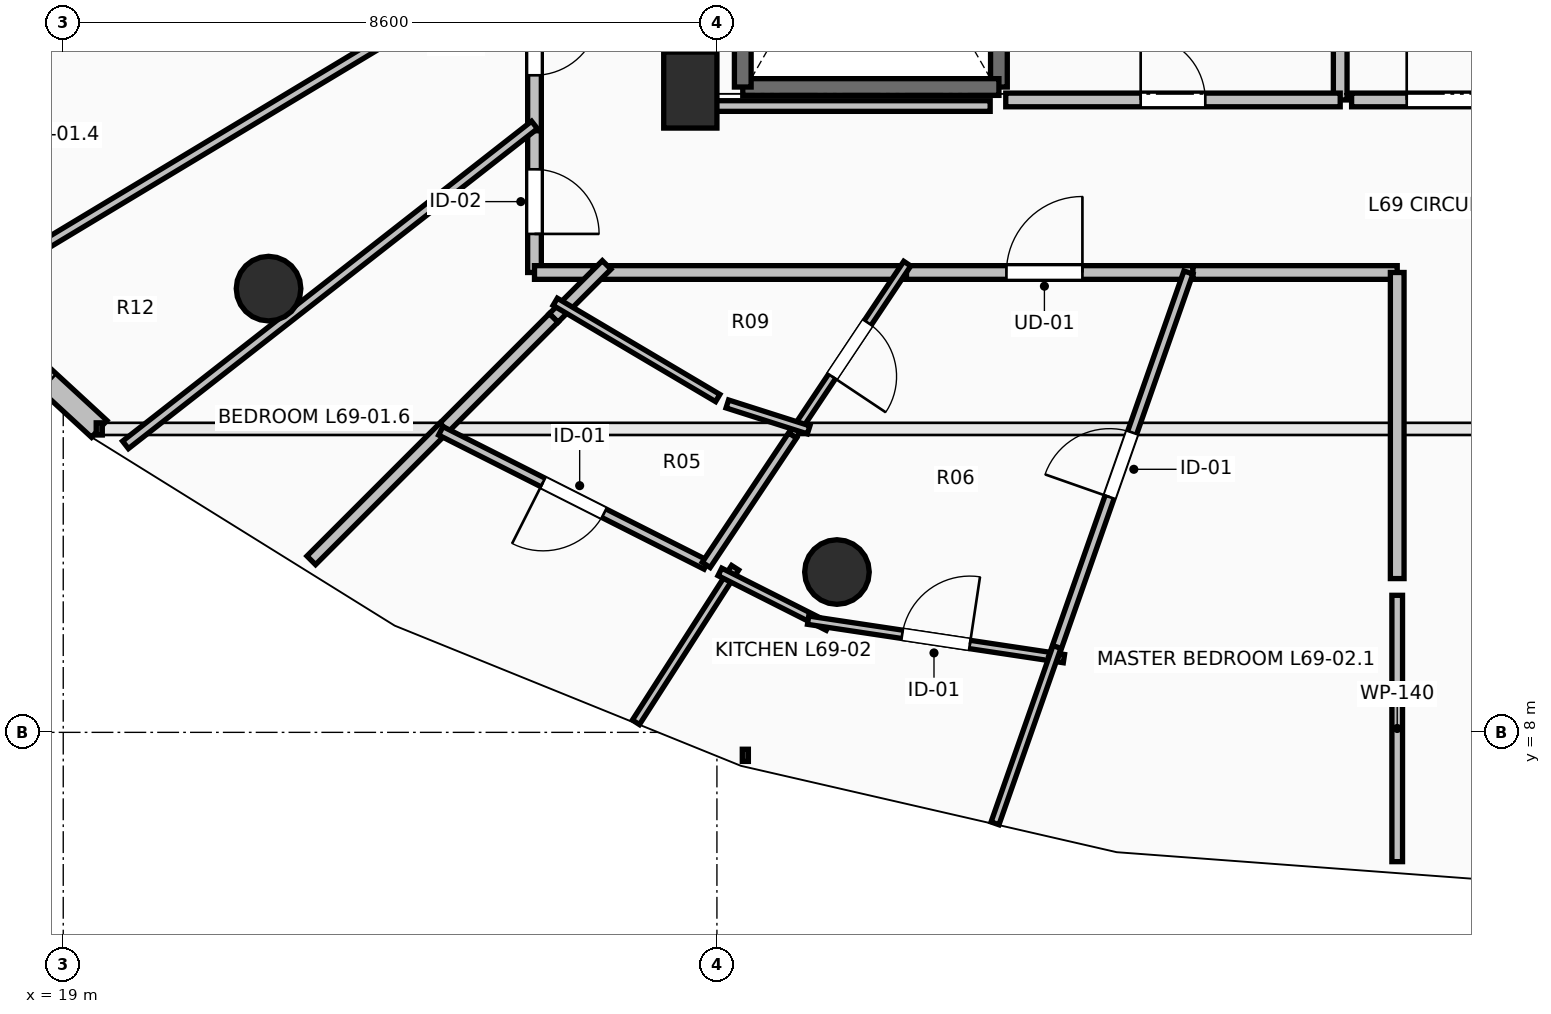
"""IFC4 building model, lengths in metres.
Left out: names, types, materials, properties, quantities, classifications, styles, units other than length and angle.
Written with IfcOpenShell. Run it as: python <this file> out.ifc"""

import sys

from ifc_helpers import new_model, si_unit, direction, frame, frame_2d, origin, origin_2d, place, context, subcontext, project, spatial, rectangle, circle, extrude, element, fill, save


model = new_model("IFC4")
c1 = context("Model", 3, precision=1e-05, world=origin(), true_north=direction((0.0, 1.0)))
c2 = subcontext(c1, "Body", "Model", "MODEL_VIEW")
j1 = project(units=[si_unit("LENGTHUNIT", "METRE"), si_unit("PLANEANGLEUNIT", "RADIAN")], contexts=[c1])
p1 = place(None, origin())
s1 = spatial("IfcSite", under=j1, at=p1, CompositionType="ELEMENT")
p2 = place(p1, origin())
s2 = spatial("IfcBuilding", under=s1, at=p2, CompositionType="ELEMENT")
p3 = place(p2, frame((0.0, 0.0, 255.55)))
s3 = spatial("IfcBuildingStorey", under=s2, at=p3, CompositionType="ELEMENT", Elevation=255.55)
for number, where, z_axis, x_axis in (
    (1, (21.701, 13.838, 0.0), (0.0, 0.0, 1.0), (-0.707, -0.707, 0.0)),
    (2, (29.179, 10.109, 0.0), (0.0, 0.0, 1.0), (-0.383, -0.924, 0.0)),
):
    element("IfcColumn", number, at=place(p3, frame(where, z_axis=z_axis, x_axis=x_axis)), inside=s3, PredefinedType="COLUMN", context=c2, shape_type="SweptSolid", body=[
        extrude(circle(Radius=0.425, at=origin_2d()), origin(), (0.0, 0.0, 1.0), 3.55),
    ])
p4 = place(p3, frame((27.25, 16.45, 0.0), z_axis=(0.0, 0.0, 1.0), x_axis=(1.0, 0.0, 0.0)))
e3 = element("IfcColumn", 3, at=p4, inside=s3, PredefinedType="PILASTER", context=c2, shape_type="SweptSolid", body=[
    extrude(rectangle(XDim=0.7, YDim=1.0, at=origin_2d()), origin(), (0.0, 0.0, 1.0), 3.55),
])
p5 = place(p3, frame((16.216, 14.994, 0.0), z_axis=(0.0, 0.0, 1.0), x_axis=(0.735445373611, -0.677584018727, 0.0)))
e4 = element("IfcWall", 4, at=p5, inside=s3, PredefinedType="STANDARD", context=c2, shape_type="SweptSolid", body=[
    extrude(rectangle(XDim=4.43, YDim=0.3, at=frame_2d((2.215, 0.0))), origin(), (0.0, 0.0, 1.0), 3.29),
])
p6 = place(p5, frame((0.258, 0.0, 0.85)))
e5 = element("IfcOpeningElement", 5, at=p6, cuts=e4, PredefinedType="OPENING", context=c2, shape_type="SweptSolid", body=[
    extrude(rectangle(XDim=1.2, YDim=1.95, at=frame_2d((0.6, 0.975))), frame((0.0, 0.165, 0.0), z_axis=(0.0, -1.0, 0.0), x_axis=(1.0, 0.0, 0.0)), (0.0, 0.0, 1.0), 0.33),
])
p7 = place(p5, frame((2.323, 0.0, 0.85)))
e6 = element("IfcOpeningElement", 6, at=p7, cuts=e4, PredefinedType="OPENING", context=c2, shape_type="SweptSolid", body=[
    extrude(rectangle(XDim=1.2, YDim=1.95, at=frame_2d((0.6, 0.975))), frame((0.0, 0.165, 0.0), z_axis=(0.0, -1.0, 0.0), x_axis=(1.0, 0.0, 0.0)), (0.0, 0.0, 1.0), 0.33),
])
p8 = place(p3, frame((31.31, 23.91, 0.0), z_axis=(0.0, 0.0, 1.0), x_axis=(0.0, -1.0, 0.0)))
e7 = element("IfcWall", 7, at=p8, inside=s3, PredefinedType="SOLIDWALL", context=c2, shape_type="SweptSolid", body=[
    extrude(rectangle(XDim=7.42, YDim=0.22, at=frame_2d((3.71, 0.0))), origin(), (0.0, 0.0, 1.0), 3.29),
])
p9 = place(p3, frame((31.31, 16.49, 0.0), z_axis=(0.0, 0.0, 1.0), x_axis=(-1.0, 0.0, 0.0)))
e8 = element("IfcWall", 8, at=p9, inside=s3, PredefinedType="SOLIDWALL", context=c2, shape_type="SweptSolid", body=[
    extrude(rectangle(XDim=3.37, YDim=0.22, at=frame_2d((1.685, 0.0))), origin(), (0.0, 0.0, 1.0), 3.29),
])
p10 = place(p3, frame((27.94, 16.49, 0.0), z_axis=(0.0, 0.0, 1.0), x_axis=(0.0, 1.0, 0.0)))
e9 = element("IfcWall", 9, at=p10, inside=s3, PredefinedType="SOLIDWALL", context=c2, shape_type="SweptSolid", body=[
    extrude(rectangle(XDim=7.42, YDim=0.22, at=frame_2d((3.71, 0.0))), origin(), (0.0, 0.0, 1.0), 3.29),
])
p11 = place(p3, frame((35.8, 16.32, 0.0), z_axis=(0.0, 0.0, 1.0), x_axis=(0.0, 1.0, 0.0)))
e10 = element("IfcWall", 10, at=p11, inside=s3, PredefinedType="PARTITIONING", context=c2, shape_type="SweptSolid", body=[
    extrude(rectangle(XDim=5.13, YDim=0.18, at=frame_2d((2.565, 0.0))), origin(), (0.0, 0.0, 1.0), 3.29),
])
p12 = place(p3, frame((31.4, 16.32, 0.0), z_axis=(0.0, 0.0, 1.0), x_axis=(1.0, 0.0, 0.0)))
e11 = element("IfcWall", 11, at=p12, inside=s3, PredefinedType="PARTITIONING", context=c2, shape_type="SweptSolid", body=[
    extrude(rectangle(XDim=4.4, YDim=0.18, at=frame_2d((2.2, 0.0))), origin(), (0.0, 0.0, 1.0), 3.29),
])
p13 = place(p12, frame((1.775, 0.0, 0.0)))
e12 = element("IfcOpeningElement", 12, at=p13, cuts=e11, PredefinedType="OPENING", context=c2, shape_type="SweptSolid", body=[
    extrude(rectangle(XDim=0.85, YDim=2.1, at=frame_2d((0.425, 1.05))), frame((0.0, 0.105, 0.0), z_axis=(0.0, -1.0, 0.0), x_axis=(1.0, 0.0, 0.0)), (0.0, 0.0, 1.0), 0.21),
])
p14 = place(p3, frame((35.95, 16.32, 0.0), z_axis=(0.0, 0.0, 1.0), x_axis=(1.0, 0.0, 0.0)))
e13 = element("IfcWall", 13, at=p14, inside=s3, PredefinedType="PARTITIONING", context=c2, shape_type="SweptSolid", body=[
    extrude(rectangle(XDim=2.85, YDim=0.18, at=frame_2d((1.425, 0.0))), origin(), (0.0, 0.0, 1.0), 3.29),
])
p15 = place(p14, frame((0.725, 0.0, 0.0)))
e14 = element("IfcOpeningElement", 14, at=p15, cuts=e13, PredefinedType="OPENING", context=c2, shape_type="SweptSolid", body=[
    extrude(rectangle(XDim=1.4, YDim=2.2, at=frame_2d((0.7, 1.1))), frame((0.0, 0.105, 0.0), z_axis=(0.0, -1.0, 0.0), x_axis=(1.0, 0.0, 0.0)), (0.0, 0.0, 1.0), 0.21),
])
p16 = place(p3, frame((25.2, 18.224, 0.0), z_axis=(0.0, 0.0, 1.0), x_axis=(0.0, -1.0, 0.0)))
e15 = element("IfcWall", 15, at=p16, inside=s3, PredefinedType="PARTITIONING", context=c2, shape_type="SweptSolid", body=[
    extrude(rectangle(XDim=2.309, YDim=0.18, at=frame_2d((1.155, 0.0))), origin(), (0.0, 0.0, 1.0), 2.482),
])
p17 = place(p16, frame((0.729, 0.0, 0.0)))
e16 = element("IfcOpeningElement", 16, at=p17, cuts=e15, PredefinedType="OPENING", context=c2, shape_type="SweptSolid", body=[
    extrude(rectangle(XDim=0.85, YDim=2.1, at=frame_2d((0.425, 1.05))), frame((0.0, 0.105, 0.0), z_axis=(0.0, -1.0, 0.0), x_axis=(1.0, 0.0, 0.0)), (0.0, 0.0, 1.0), 0.21),
])
p18 = place(p3, frame((25.2, 15.915, 0.0), z_axis=(0.0, 0.0, 1.0), x_axis=(0.0, -1.0, 0.0)))
e17 = element("IfcWall", 17, at=p18, inside=s3, PredefinedType="PARTITIONING", context=c2, shape_type="SweptSolid", body=[
    extrude(rectangle(XDim=1.865, YDim=0.18, at=frame_2d((0.933, 0.0))), origin(), (0.0, 0.0, 1.0), 2.482),
])
p19 = place(p18, frame((0.508, 0.0, 0.0)))
e18 = element("IfcOpeningElement", 18, at=p19, cuts=e17, PredefinedType="OPENING", context=c2, shape_type="SweptSolid", body=[
    extrude(rectangle(XDim=0.85, YDim=2.1, at=frame_2d((0.425, 1.05))), frame((0.0, 0.105, 0.0), z_axis=(0.0, -1.0, 0.0), x_axis=(1.0, 0.0, 0.0)), (0.0, 0.0, 1.0), 0.21),
])
p20 = place(p3, frame((25.2, 14.05, 0.0), z_axis=(0.0, 0.0, 1.0), x_axis=(1.0, 0.0, 0.0)))
e19 = element("IfcWall", 19, at=p20, inside=s3, PredefinedType="PARTITIONING", context=c2, shape_type="SweptSolid", body=[
    extrude(rectangle(XDim=0.91, YDim=0.18, at=frame_2d((0.455, 0.0))), origin(), (0.0, 0.0, 1.0), 3.022),
])
p21 = place(p3, frame((29.954, 14.05, 0.0), z_axis=(0.0, 0.0, 1.0), x_axis=(1.0, 0.0, 0.0)))
e20 = element("IfcWall", 20, at=p21, inside=s3, PredefinedType="PARTITIONING", context=c2, shape_type="SweptSolid", body=[
    extrude(rectangle(XDim=3.909, YDim=0.18, at=frame_2d((1.955, 0.0))), origin(), (0.0, 0.0, 1.0), 2.936),
])
p22 = place(p21, frame((1.455, 0.0, 0.0)))
e21 = element("IfcOpeningElement", 21, at=p22, cuts=e20, PredefinedType="OPENING", context=c2, shape_type="SweptSolid", body=[
    extrude(rectangle(XDim=1.0, YDim=2.15, at=frame_2d((0.5, 1.075))), frame((0.0, 0.105, 0.0), z_axis=(0.0, -1.0, 0.0), x_axis=(1.0, 0.0, 0.0)), (0.0, 0.0, 1.0), 0.21),
])
p23 = place(p3, frame((25.97, 14.05, 0.0), z_axis=(0.0, 0.0, 1.0), x_axis=(1.0, 0.0, 0.0)))
e22 = element("IfcWall", 22, at=p23, inside=s3, PredefinedType="PARTITIONING", context=c2, shape_type="SweptSolid", body=[
    extrude(rectangle(XDim=4.124, YDim=0.18, at=frame_2d((2.062, 0.0))), origin(), (0.0, 0.0, 1.0), 2.482),
])
p24 = place(p3, frame((33.863, 14.05, 0.0), z_axis=(0.0, 0.0, 1.0), x_axis=(1.0, 0.0, 0.0)))
e23 = element("IfcWall", 23, at=p24, inside=s3, PredefinedType="PARTITIONING", context=c2, shape_type="SweptSolid", body=[
    extrude(rectangle(XDim=2.687, YDim=0.18, at=frame_2d((1.344, 0.0))), origin(), (0.0, 0.0, 1.0), 2.936),
])
p25 = place(p3, frame((36.55, 14.05, 0.0), z_axis=(0.0, 0.0, 1.0), x_axis=(0.0, -1.0, 0.0)))
e24 = element("IfcWall", 24, at=p25, inside=s3, PredefinedType="PARTITIONING", context=c2, shape_type="SweptSolid", body=[
    extrude(rectangle(XDim=4.027, YDim=0.18, at=frame_2d((2.014, 0.0))), origin(), (0.0, 0.0, 1.0), 2.936),
])
p26 = place(p3, frame((15.533, 15.962, 0.0), z_axis=(0.0, 0.0, 1.0), x_axis=(0.913015836792, 0.407924112756, 0.0)))
e25 = element("IfcWall", 25, at=p26, inside=s3, PredefinedType="PARTITIONING", context=c2, shape_type="SweptSolid", body=[
    extrude(rectangle(XDim=10.588, YDim=0.125, at=frame_2d((5.294, 0.0))), origin(), (0.0, 0.0, 1.0), 2.482),
])
p27 = place(p3, frame((17.602, 13.72, 0.0), z_axis=(0.0, 0.0, 1.0), x_axis=(0.856734134601, 0.515758298633, 0.0)))
e26 = element("IfcWall", 26, at=p27, inside=s3, PredefinedType="PARTITIONING", context=c2, shape_type="SweptSolid", body=[
    extrude(rectangle(XDim=8.868, YDim=0.125, at=frame_2d((4.434, 0.0))), origin(), (0.0, 0.0, 1.0), 2.482),
])
p28 = place(p3, frame((19.819, 11.782, 0.0), z_axis=(0.0, 0.0, 1.0), x_axis=(0.78765580417, 0.61611552014, 0.0)))
e27 = element("IfcWall", 27, at=p28, inside=s3, PredefinedType="PARTITIONING", context=c2, shape_type="SweptSolid", body=[
    extrude(rectangle(XDim=6.832, YDim=0.125, at=frame_2d((3.416, 0.0))), origin(), (0.0, 0.0, 1.0), 2.482),
])
p29 = place(p3, frame((22.263, 10.263, 0.0), z_axis=(0.0, 0.0, 1.0), x_axis=(0.707106781187, 0.707106781187, 0.0)))
e28 = element("IfcWall", 28, at=p29, inside=s3, PredefinedType="PARTITIONING", context=c2, shape_type="SweptSolid", body=[
    extrude(rectangle(XDim=2.473, YDim=0.16, at=frame_2d((1.237, 0.0))), origin(), (0.0, 0.0, 1.0), 3.29),
])
p30 = place(p3, frame((25.452, 13.452, 0.0), z_axis=(0.0, 0.0, 1.0), x_axis=(0.707106781187, 0.707106781187, 0.0)))
e29 = element("IfcWall", 29, at=p30, inside=s3, PredefinedType="PARTITIONING", context=c2, shape_type="SweptSolid", body=[
    extrude(rectangle(XDim=0.986, YDim=0.16, at=frame_2d((0.493, 0.0))), origin(), (0.0, 0.0, 1.0), 3.022),
])
p31 = place(p3, frame((24.012, 12.012, 0.0), z_axis=(0.0, 0.0, 1.0), x_axis=(0.707106781187, 0.707106781187, 0.0)))
e30 = element("IfcWall", 30, at=p31, inside=s3, PredefinedType="PARTITIONING", context=c2, shape_type="SweptSolid", body=[
    extrude(rectangle(XDim=2.036, YDim=0.16, at=frame_2d((1.018, 0.0))), origin(), (0.0, 0.0, 1.0), 2.874),
])
p32 = place(p3, frame((30.104, 14.167, 0.0), z_axis=(0.0, 0.0, 1.0), x_axis=(-0.555011080332, -0.831842954354, 0.0)))
e31 = element("IfcWall", 31, at=p32, inside=s3, PredefinedType="PARTITIONING", context=c2, shape_type="SweptSolid", body=[
    extrude(rectangle(XDim=2.718, YDim=0.11, at=frame_2d((1.359, 0.0))), origin(), (0.0, 0.0, 1.0), 2.482),
])
p33 = place(p32, frame((0.934, 0.0, 0.0)))
e32 = element("IfcOpeningElement", 32, at=p33, cuts=e31, PredefinedType="OPENING", context=c2, shape_type="SweptSolid", body=[
    extrude(rectangle(XDim=0.85, YDim=2.1, at=frame_2d((0.425, 1.05))), frame((0.0, 0.07, 0.0), z_axis=(0.0, -1.0, 0.0), x_axis=(1.0, 0.0, 0.0)), (0.0, 0.0, 1.0), 0.14),
])
p34 = place(p3, frame((26.534, 8.132, 0.0), z_axis=(0.0, 0.0, 1.0), x_axis=(0.540114041626, 0.841591838149, 0.0)))
e33 = element("IfcWall", 33, at=p34, inside=s3, PredefinedType="PARTITIONING", context=c2, shape_type="SweptSolid", body=[
    extrude(rectangle(XDim=2.417, YDim=0.11, at=frame_2d((1.208, 0.0))), origin(), (0.0, 0.0, 1.0), 3.29),
])
p35 = place(p3, frame((27.639, 10.111, 0.0), z_axis=(0.0, 0.0, 1.0), x_axis=(0.892614165752, -0.45082141819, 0.0)))
e34 = element("IfcWall", 34, at=p35, inside=s3, PredefinedType="PARTITIONING", context=c2, shape_type="SweptSolid", body=[
    extrude(rectangle(XDim=1.595, YDim=0.11, at=frame_2d((0.798, 0.0))), origin(), (0.0, 0.0, 1.0), 3.29),
])
p36 = place(p3, frame((28.8, 9.476, 0.0), z_axis=(0.0, 0.0, 1.0), x_axis=(0.988903707347, -0.148557926731, 0.0)))
e35 = element("IfcWall", 35, at=p36, inside=s3, PredefinedType="PARTITIONING", context=c2, shape_type="SweptSolid", body=[
    extrude(rectangle(XDim=3.404, YDim=0.11, at=frame_2d((1.702, 0.0))), origin(), (0.0, 0.0, 1.0), 3.29),
])
p37 = place(p36, frame((1.252, 0.0, 0.0)))
e36 = element("IfcOpeningElement", 36, at=p37, cuts=e35, PredefinedType="OPENING", context=c2, shape_type="SweptSolid", body=[
    extrude(rectangle(XDim=0.9, YDim=2.1, at=frame_2d((0.45, 1.05))), frame((0.0, 0.07, 0.0), z_axis=(0.0, -1.0, 0.0), x_axis=(1.0, 0.0, 0.0)), (0.0, 0.0, 1.0), 0.14),
])
p38 = place(p3, frame((27.459, 10.203, 0.0), z_axis=(0.0, 0.0, 1.0), x_axis=(-0.892559828496, 0.450928988374, 0.0)))
e37 = element("IfcWall", 37, at=p38, inside=s3, PredefinedType="PARTITIONING", context=c2, shape_type="SweptSolid", body=[
    extrude(rectangle(XDim=3.912, YDim=0.125, at=frame_2d((1.956, 0.0))), origin(), (0.0, 0.0, 1.0), 3.29),
])
p39 = place(p38, frame((1.506, 0.0, 0.0)))
e38 = element("IfcOpeningElement", 38, at=p39, cuts=e37, PredefinedType="OPENING", context=c2, shape_type="SweptSolid", body=[
    extrude(rectangle(XDim=0.9, YDim=2.1, at=frame_2d((0.45, 1.05))), frame((0.0, 0.077, 0.0), z_axis=(0.0, -1.0, 0.0), x_axis=(1.0, 0.0, 0.0)), (0.0, 0.0, 1.0), 0.155),
])
p40 = place(p3, frame((28.595, 11.906, 0.0), z_axis=(0.0, 0.0, 1.0), x_axis=(-0.555085472594, -0.831793314541, 0.0)))
e39 = element("IfcWall", 39, at=p40, inside=s3, PredefinedType="PARTITIONING", context=c2, shape_type="SweptSolid", body=[
    extrude(rectangle(XDim=2.047, YDim=0.125, at=frame_2d((1.023, 0.0))), origin(), (0.0, 0.0, 1.0), 2.482),
])
p41 = place(p3, frame((32.027, 8.991, 0.0), z_axis=(0.0, 0.0, 1.0), x_axis=(0.331214316781, 0.943555550224, 0.0)))
e40 = element("IfcWall", 40, at=p41, inside=s3, PredefinedType="PARTITIONING", context=c2, shape_type="SweptSolid", body=[
    extrude(rectangle(XDim=5.362, YDim=0.125, at=frame_2d((2.681, 0.0))), origin(), (0.0, 0.0, 1.0), 2.874),
])
p42 = place(p41, frame((2.231, 0.0, 0.0)))
e41 = element("IfcOpeningElement", 41, at=p42, cuts=e40, PredefinedType="OPENING", context=c2, shape_type="SweptSolid", body=[
    extrude(rectangle(XDim=0.9, YDim=2.1, at=frame_2d((0.45, 1.05))), frame((0.0, 0.077, 0.0), z_axis=(0.0, -1.0, 0.0), x_axis=(1.0, 0.0, 0.0)), (0.0, 0.0, 1.0), 0.155),
])
p43 = place(p3, frame((25.472, 13.664, 0.0), z_axis=(0.0, 0.0, 1.0), x_axis=(0.860546797705, -0.509371386082, 0.0)))
e42 = element("IfcWall", 42, at=p43, inside=s3, PredefinedType="PARTITIONING", context=c2, shape_type="SweptSolid", body=[
    extrude(rectangle(XDim=2.485, YDim=0.11, at=frame_2d((1.242, 0.0))), origin(), (0.0, 0.0, 1.0), 3.022),
])
p44 = place(p3, frame((27.737, 12.321, 0.0), z_axis=(0.0, 0.0, 1.0), x_axis=(0.952754298981, -0.303742071127, 0.0)))
e43 = element("IfcWall", 43, at=p44, inside=s3, PredefinedType="PARTITIONING", context=c2, shape_type="SweptSolid", body=[
    extrude(rectangle(XDim=1.123, YDim=0.11, at=frame_2d((0.562, 0.0))), origin(), (0.0, 0.0, 1.0), 2.482),
])
p45 = place(p3, frame((31.259, 6.803, 0.0), z_axis=(0.0, 0.0, 1.0), x_axis=(0.331407174133, 0.943487829775, 0.0)))
e44 = element("IfcWall", 44, at=p45, inside=s3, PredefinedType="PARTITIONING", context=c2, shape_type="SweptSolid", body=[
    extrude(rectangle(XDim=2.459, YDim=0.11, at=frame_2d((1.229, 0.0))), origin(), (0.0, 0.0, 1.0), 3.29),
])
p46 = place(p3, frame((36.55, 9.803, 0.0), z_axis=(0.0, 0.0, 1.0), x_axis=(0.0, -1.0, 0.0)))
e45 = element("IfcWall", 45, at=p46, inside=s3, PredefinedType="PARTITIONING", context=c2, shape_type="SweptSolid", body=[
    extrude(rectangle(XDim=3.504, YDim=0.14, at=frame_2d((1.752, 0.0))), origin(), (0.0, 0.0, 1.0), 2.874),
])
p47 = place(p3, frame((27.45, 23.754, 0.0), z_axis=(0.0, 0.0, 1.0), x_axis=(0.0, -1.0, 0.0)))
e46 = element("IfcWall", 46, at=p47, inside=s3, PredefinedType="PARTITIONING", context=c2, shape_type="SweptSolid", body=[
    extrude(rectangle(XDim=7.514, YDim=0.14, at=frame_2d((3.757, 0.0))), origin(), (0.0, 0.0, 1.0), 2.482),
])
p48 = place(p3, frame((27.45, 16.24, 0.0), z_axis=(0.0, 0.0, 1.0), x_axis=(1.0, 0.0, 0.0)))
e47 = element("IfcWall", 47, at=p48, inside=s3, PredefinedType="PARTITIONING", context=c2, shape_type="SweptSolid", body=[
    extrude(rectangle(XDim=3.745, YDim=0.14, at=frame_2d((1.873, 0.0))), origin(), (0.0, 0.0, 1.0), 2.482),
])
p49 = place(p13, origin())
e48 = element("IfcDoor", 48, at=p49, inside=s3, OperationType="SINGLE_SWING_LEFT", PredefinedType="DOOR", context=c2, shape_type="SweptSolid", body=[
    extrude(rectangle(XDim=0.85, YDim=2.1, at=frame_2d((0.425, 1.05))), frame((0.0, 0.025, 0.0), z_axis=(0.0, -1.0, 0.0), x_axis=(1.0, 0.0, 0.0)), (0.0, 0.0, 1.0), 0.05),
])
fill(e12, e48)
p50 = place(p15, origin())
e49 = element("IfcDoor", 49, at=p50, inside=s3, OperationType="DOUBLE_SWING_LEFT", PredefinedType="DOOR", context=c2, shape_type="SweptSolid", body=[
    extrude(rectangle(XDim=1.4, YDim=2.2, at=frame_2d((0.7, 1.1))), frame((0.0, 0.025, 0.0), z_axis=(0.0, -1.0, 0.0), x_axis=(1.0, 0.0, 0.0)), (0.0, 0.0, 1.0), 0.05),
])
fill(e14, e49)
p51 = place(p22, origin())
e50 = element("IfcDoor", 50, at=p51, inside=s3, OperationType="SINGLE_SWING_RIGHT", PredefinedType="DOOR", context=c2, shape_type="SweptSolid", body=[
    extrude(rectangle(XDim=1.0, YDim=2.15, at=frame_2d((0.5, 1.075))), frame((0.0, 0.025, 0.0), z_axis=(0.0, -1.0, 0.0), x_axis=(1.0, 0.0, 0.0)), (0.0, 0.0, 1.0), 0.05),
])
fill(e21, e50)
p52 = place(p33, origin())
e51 = element("IfcDoor", 51, at=p52, inside=s3, OperationType="SINGLE_SWING_RIGHT", PredefinedType="DOOR", context=c2, shape_type="SweptSolid", body=[
    extrude(rectangle(XDim=0.85, YDim=2.1, at=frame_2d((0.425, 1.05))), frame((0.0, 0.025, 0.0), z_axis=(0.0, -1.0, 0.0), x_axis=(1.0, 0.0, 0.0)), (0.0, 0.0, 1.0), 0.05),
])
fill(e32, e51)
p53 = place(p37, origin())
e52 = element("IfcDoor", 52, at=p53, inside=s3, OperationType="SINGLE_SWING_RIGHT", PredefinedType="DOOR", context=c2, shape_type="SweptSolid", body=[
    extrude(rectangle(XDim=0.9, YDim=2.1, at=frame_2d((0.45, 1.05))), frame((0.0, 0.025, 0.0), z_axis=(0.0, -1.0, 0.0), x_axis=(1.0, 0.0, 0.0)), (0.0, 0.0, 1.0), 0.05),
])
fill(e36, e52)
p54 = place(p39, origin())
e53 = element("IfcDoor", 53, at=p54, inside=s3, OperationType="SINGLE_SWING_RIGHT", PredefinedType="DOOR", context=c2, shape_type="SweptSolid", body=[
    extrude(rectangle(XDim=0.9, YDim=2.1, at=frame_2d((0.45, 1.05))), frame((0.0, 0.025, 0.0), z_axis=(0.0, -1.0, 0.0), x_axis=(1.0, 0.0, 0.0)), (0.0, 0.0, 1.0), 0.05),
])
fill(e38, e53)
p55 = place(p42, origin())
e54 = element("IfcDoor", 54, at=p55, inside=s3, OperationType="SINGLE_SWING_LEFT", PredefinedType="DOOR", context=c2, shape_type="SweptSolid", body=[
    extrude(rectangle(XDim=0.9, YDim=2.1, at=frame_2d((0.45, 1.05))), frame((0.0, 0.025, 0.0), z_axis=(0.0, -1.0, 0.0), x_axis=(1.0, 0.0, 0.0)), (0.0, 0.0, 1.0), 0.05),
])
fill(e41, e54)
p56 = place(p17, origin())
e55 = element("IfcDoor", 55, at=p56, inside=s3, OperationType="SINGLE_SWING_LEFT", PredefinedType="DOOR", context=c2, shape_type="SweptSolid", body=[
    extrude(rectangle(XDim=0.85, YDim=2.1, at=frame_2d((0.425, 1.05))), frame((0.0, 0.025, 0.0), z_axis=(0.0, -1.0, 0.0), x_axis=(1.0, 0.0, 0.0)), (0.0, 0.0, 1.0), 0.05),
])
fill(e16, e55)
p57 = place(p19, origin())
e56 = element("IfcDoor", 56, at=p57, inside=s3, OperationType="SINGLE_SWING_RIGHT", PredefinedType="DOOR", context=c2, shape_type="SweptSolid", body=[
    extrude(rectangle(XDim=0.85, YDim=2.1, at=frame_2d((0.425, 1.05))), frame((0.0, 0.025, 0.0), z_axis=(0.0, -1.0, 0.0), x_axis=(1.0, 0.0, 0.0)), (0.0, 0.0, 1.0), 0.05),
])
fill(e18, e56)
save(model, sys.argv[1])
